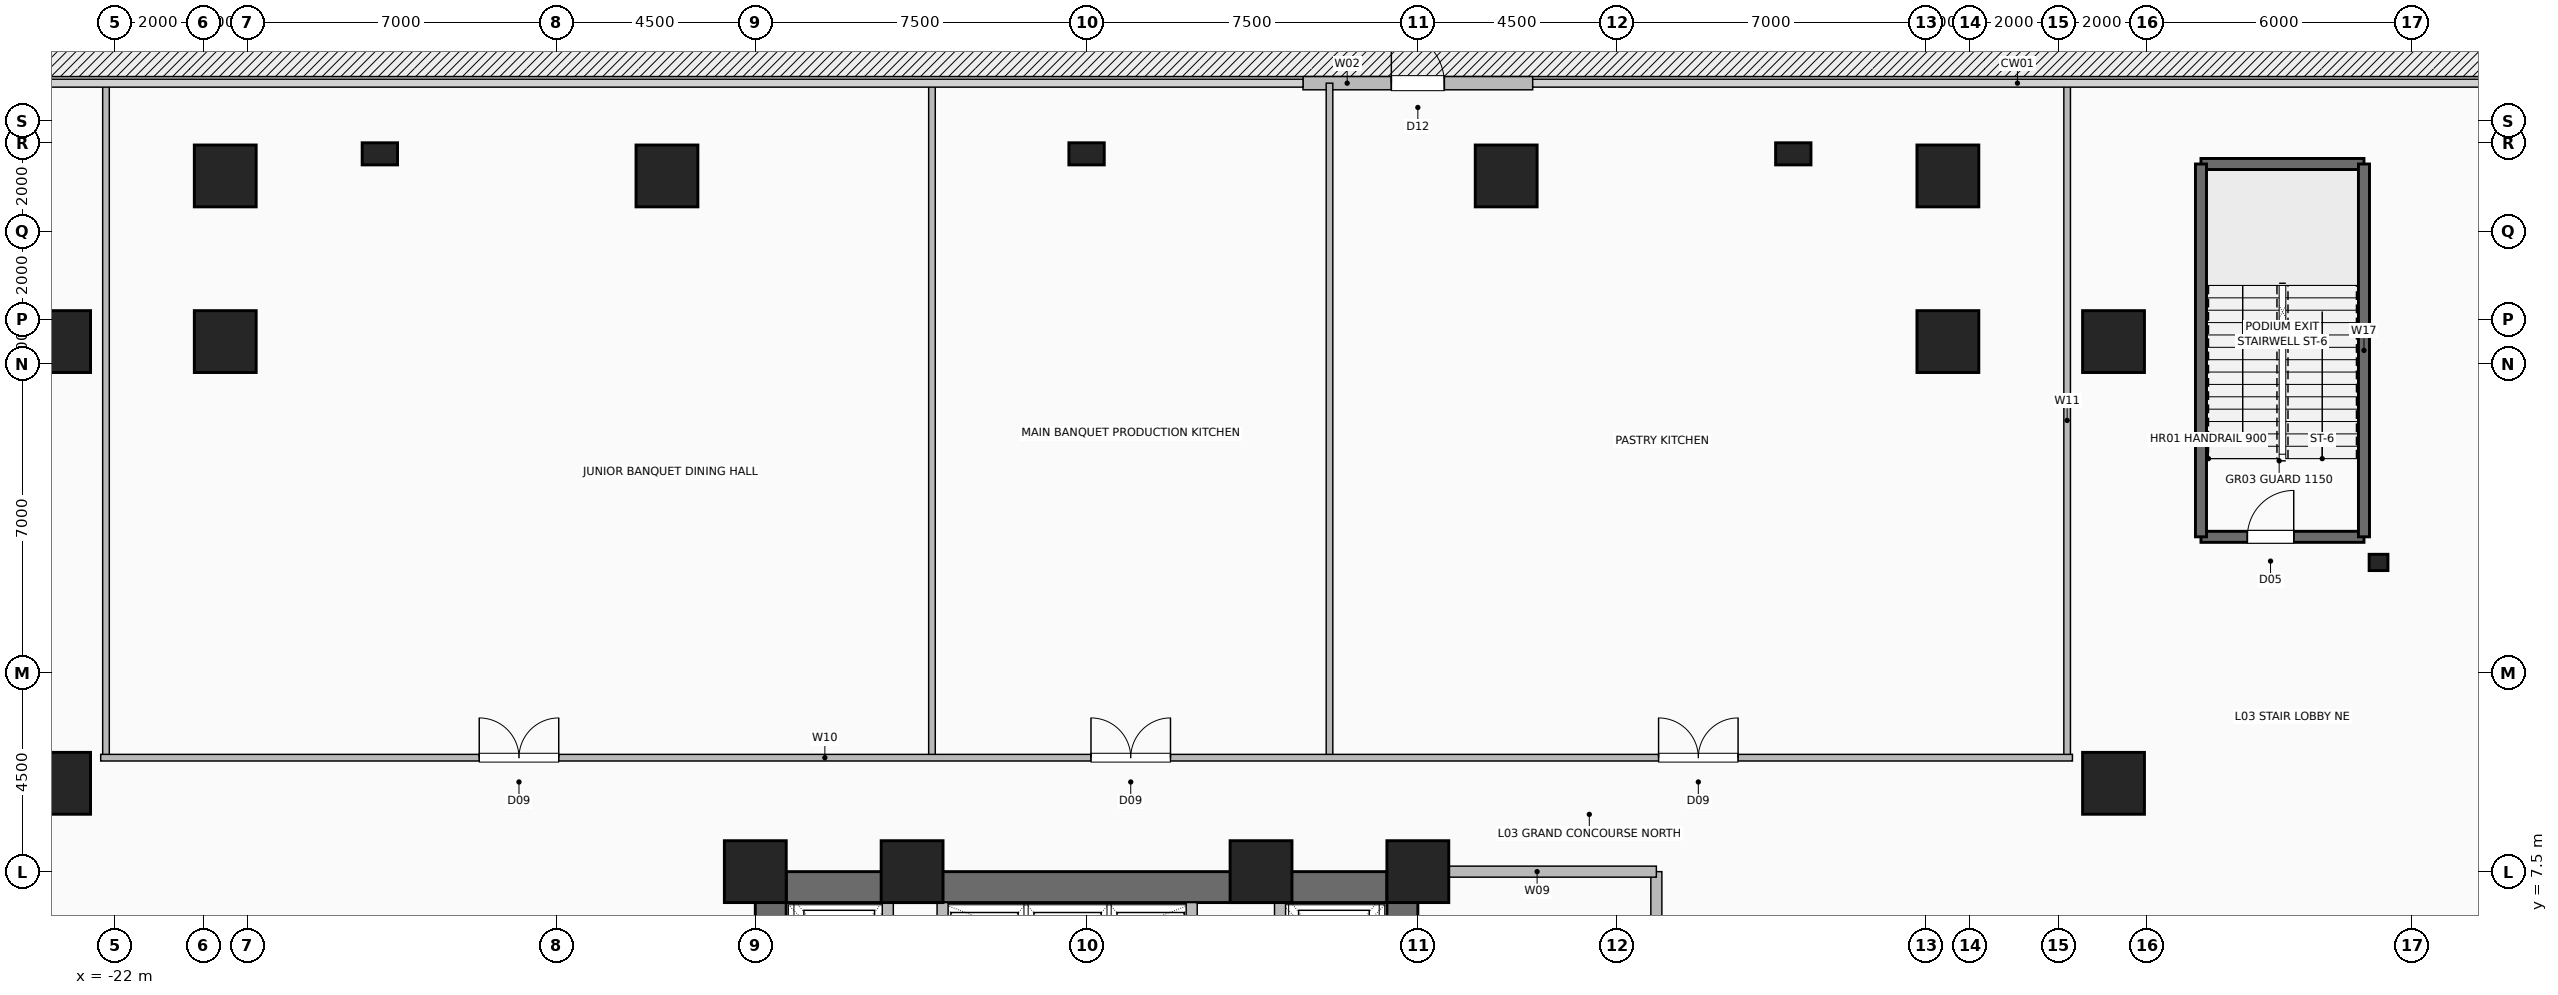
"""IFC4 building model, lengths in metres.
Left out: names, types, materials, properties, quantities, classifications, styles, units other than length and angle.
Written with IfcOpenShell. Run it as: python <this file> out.ifc"""

import sys

from ifc_helpers import new_model, si_unit, direction, frame, frame_2d, origin, origin_2d, place, context, subcontext, project, spatial, rectangle, hollow_rectangle, i_section, extrude, element, fill, save


model = new_model("IFC4")
c1 = context("Model", 3, precision=1e-05, world=origin(), true_north=direction((0.0, 1.0)))
c2 = subcontext(c1, "Body", "Model", "MODEL_VIEW")
j1 = project(units=[si_unit("LENGTHUNIT", "METRE"), si_unit("PLANEANGLEUNIT", "RADIAN")], contexts=[c1])
p1 = place(None, origin())
s1 = spatial("IfcSite", under=j1, at=p1, CompositionType="ELEMENT")
p2 = place(p1, origin())
s2 = spatial("IfcBuilding", under=s1, at=p2, CompositionType="ELEMENT")
p3 = place(p2, frame((0.0, 0.0, 16.2)))
s3 = spatial("IfcBuildingStorey", under=s2, at=p3, CompositionType="ELEMENT", Elevation=16.2)
for number, where, z_axis, x_axis in (
    (1, (7.5, 7.5, 0.0), (0.0, 0.0, 1.0), (1.0, 0.0, 0.0)),
    (2, (3.95, 7.5, 0.0), (0.0, 0.0, 1.0), (1.0, 0.0, 0.0)),
    (3, (-3.95, 7.5, 0.0), (0.0, 0.0, 1.0), (1.0, 0.0, 0.0)),
    (4, (-7.5, 7.5, 0.0), (0.0, 0.0, 1.0), (1.0, 0.0, 0.0)),
    (5, (-19.5, 23.25, 0.0), (0.0, 0.0, 1.0), (1.0, 0.0, 0.0)),
    (6, (-9.5, 23.25, 0.0), (0.0, 0.0, 1.0), (1.0, 0.0, 0.0)),
    (7, (9.5, 23.25, 0.0), (0.0, 0.0, 1.0), (1.0, 0.0, 0.0)),
    (8, (19.5, 23.25, 0.0), (0.0, 0.0, 1.0), (1.0, 0.0, 0.0)),
    (9, (-23.25, 9.5, 0.0), (0.0, 0.0, 1.0), (1.0, 0.0, 0.0)),
    (10, (-23.25, 19.5, 0.0), (0.0, 0.0, 1.0), (1.0, 0.0, 0.0)),
    (11, (23.25, 9.5, 0.0), (0.0, 0.0, 1.0), (1.0, 0.0, 0.0)),
    (12, (23.25, 19.5, 0.0), (0.0, 0.0, 1.0), (1.0, 0.0, 0.0)),
    (13, (19.5, 19.5, 0.0), (0.0, 0.0, 1.0), (1.0, 0.0, 0.0)),
    (14, (-19.5, 19.5, 0.0), (0.0, 0.0, 1.0), (1.0, 0.0, 0.0)),
):
    element("IfcColumn", number, at=place(p3, frame(where, z_axis=z_axis, x_axis=x_axis)), inside=s3, PredefinedType="COLUMN", context=c2, shape_type="SweptSolid", body=[
        extrude(hollow_rectangle(XDim=1.4, YDim=1.4, WallThickness=0.06, at=origin_2d()), origin(), (0.0, 0.0, 1.0), 5.4),
    ])
p4 = place(p3, frame((29.25, 14.5, 0.0), z_axis=(0.0, 0.0, 1.0), x_axis=(1.0, 0.0, 0.0)))
e15 = element("IfcColumn", 15, at=p4, inside=s3, PredefinedType="COLUMN", context=c2, shape_type="SweptSolid", body=[
    extrude(i_section(OverallWidth=0.368, OverallDepth=0.425, WebThickness=0.03, FlangeThickness=0.048, FilletRadius=0.02, at=origin_2d()), origin(), (0.0, 0.0, 1.0), 5.4),
])
for number, where, z_axis, x_axis in (
    (16, (-16.0, 23.75, 0.0), (0.0, 0.0, 1.0), (1.0, 0.0, 0.0)),
    (17, (0.0, 23.75, 0.0), (0.0, 0.0, 1.0), (1.0, 0.0, 0.0)),
    (18, (16.0, 23.75, 0.0), (0.0, 0.0, 1.0), (1.0, 0.0, 0.0)),
):
    element("IfcColumn", number, at=place(p3, frame(where, z_axis=z_axis, x_axis=x_axis)), inside=s3, PredefinedType="PILASTER", context=c2, shape_type="SweptSolid", body=[
        extrude(rectangle(XDim=0.5, YDim=0.8, at=origin_2d()), origin(), (0.0, 0.0, 1.0), 5.4),
    ])
p5 = place(p3, frame((4.9, 25.35, 0.0), z_axis=(0.0, 0.0, 1.0), x_axis=(1.0, 0.0, 0.0)))
e19 = element("IfcWall", 19, at=p5, inside=s3, PredefinedType="SOLIDWALL", context=c2, shape_type="SweptSolid", body=[
    extrude(rectangle(XDim=5.2, YDim=0.3, at=frame_2d((2.6, 0.0))), origin(), (0.0, 0.0, 1.0), 5.0),
])
p6 = place(p5, frame((2.0, 0.0, 0.0)))
e20 = element("IfcOpeningElement", 20, at=p6, cuts=e19, PredefinedType="OPENING", context=c2, shape_type="SweptSolid", body=[
    extrude(rectangle(XDim=1.2, YDim=2.25, at=frame_2d((0.6, 1.125))), frame((0.0, 0.16, 0.0), z_axis=(0.0, -1.0, 0.0), x_axis=(1.0, 0.0, 0.0)), (0.0, 0.0, 1.0), 0.32),
])
p7 = place(p3, frame((-7.5, 7.15, 0.0), z_axis=(0.0, 0.0, 1.0), x_axis=(1.0, 0.0, 0.0)))
e21 = element("IfcWall", 21, at=p7, inside=s3, PredefinedType="SHEAR", context=c2, shape_type="SweptSolid", body=[
    extrude(rectangle(XDim=15.0, YDim=0.7, at=frame_2d((7.5, 0.0))), origin(), (0.0, 0.0, 1.0), 5.0),
])
p8 = place(p3, frame((-7.15, -7.5, 0.0), z_axis=(0.0, 0.0, 1.0), x_axis=(0.0, 1.0, 0.0)))
e22 = element("IfcWall", 22, at=p8, inside=s3, PredefinedType="SHEAR", context=c2, shape_type="SweptSolid", body=[
    extrude(rectangle(XDim=15.0, YDim=0.7, at=frame_2d((7.5, 0.0))), origin(), (0.0, 0.0, 1.0), 5.0),
])
p9 = place(p8, frame((9.5, 0.0, 0.0)))
e23 = element("IfcOpeningElement", 23, at=p9, cuts=e22, PredefinedType="OPENING", context=c2, shape_type="SweptSolid", body=[
    extrude(rectangle(XDim=1.0, YDim=2.08, at=frame_2d((0.5, 1.04))), frame((0.0, 0.36, 0.0), z_axis=(0.0, -1.0, 0.0), x_axis=(1.0, 0.0, 0.0)), (0.0, 0.0, 1.0), 0.72),
])
p10 = place(p3, frame((7.15, -7.5, 0.0), z_axis=(0.0, 0.0, 1.0), x_axis=(0.0, 1.0, 0.0)))
e24 = element("IfcWall", 24, at=p10, inside=s3, PredefinedType="SHEAR", context=c2, shape_type="SweptSolid", body=[
    extrude(rectangle(XDim=15.0, YDim=0.7, at=frame_2d((7.5, 0.0))), origin(), (0.0, 0.0, 1.0), 5.0),
])
p11 = place(p10, frame((12.6, 0.0, 0.0)))
e25 = element("IfcOpeningElement", 25, at=p11, cuts=e24, PredefinedType="OPENING", context=c2, shape_type="SweptSolid", body=[
    extrude(rectangle(XDim=1.2, YDim=2.2, at=frame_2d((0.6, 1.1))), frame((0.0, 0.36, 0.0), z_axis=(0.0, -1.0, 0.0), x_axis=(1.0, 0.0, 0.0)), (0.0, 0.0, 1.0), 0.72),
])
for number, where, z_axis, x_axis in (
    (26, (-3.26, 4.58, 0.0), (0.0, 0.0, 1.0), (0.0, 1.0, 0.0)),
    (27, (2.38, 4.58, 0.0), (0.0, 0.0, 1.0), (0.0, 1.0, 0.0)),
):
    element("IfcWall", number, at=place(p3, frame(where, z_axis=z_axis, x_axis=x_axis)), inside=s3, PredefinedType="SHEAR", context=c2, shape_type="SweptSolid", body=[
        extrude(rectangle(XDim=2.22, YDim=0.25, at=frame_2d((1.11, 0.0))), origin(), (0.0, 0.0, 1.0), 5.0),
    ])
p12 = place(p3, frame((-4.5, 4.35, 0.0), z_axis=(0.0, 0.0, 1.0), x_axis=(0.0, 1.0, 0.0)))
e28 = element("IfcWall", 28, at=p12, inside=s3, PredefinedType="SHEAR", context=c2, shape_type="SweptSolid", body=[
    extrude(rectangle(XDim=2.85, YDim=0.25, at=frame_2d((1.425, 0.0))), origin(), (0.0, 0.0, 1.0), 5.0),
])
p13 = place(p3, frame((4.38, 4.3, 0.0), z_axis=(0.0, 0.0, 1.0), x_axis=(0.0, 1.0, 0.0)))
e29 = element("IfcWall", 29, at=p13, inside=s3, PredefinedType="SHEAR", context=c2, shape_type="SweptSolid", body=[
    extrude(rectangle(XDim=2.5, YDim=0.25, at=frame_2d((1.25, 0.0))), origin(), (0.0, 0.0, 1.0), 5.0),
])
p14 = place(p3, frame((25.23, 15.08, 0.0), z_axis=(0.0, 0.0, 1.0), x_axis=(1.0, 0.0, 0.0)))
e30 = element("IfcWall", 30, at=p14, inside=s3, PredefinedType="SHEAR", context=c2, shape_type="SweptSolid", body=[
    extrude(rectangle(XDim=3.69, YDim=0.25, at=frame_2d((1.845, 0.0))), origin(), (0.0, 0.0, 1.0), 5.0),
])
p15 = place(p14, frame((1.05, 0.0, 0.0)))
e31 = element("IfcOpeningElement", 31, at=p15, cuts=e30, PredefinedType="OPENING", context=c2, shape_type="SweptSolid", body=[
    extrude(rectangle(XDim=1.05, YDim=2.08, at=frame_2d((0.525, 1.04))), frame((0.0, 0.135, 0.0), z_axis=(0.0, -1.0, 0.0), x_axis=(1.0, 0.0, 0.0)), (0.0, 0.0, 1.0), 0.27),
])
p16 = place(p3, frame((25.23, 23.52, 0.0), z_axis=(0.0, 0.0, 1.0), x_axis=(1.0, 0.0, 0.0)))
e32 = element("IfcWall", 32, at=p16, inside=s3, PredefinedType="SHEAR", context=c2, shape_type="SweptSolid", body=[
    extrude(rectangle(XDim=3.69, YDim=0.25, at=frame_2d((1.845, 0.0))), origin(), (0.0, 0.0, 1.0), 5.0),
])
for number, where, z_axis, x_axis in (
    (33, (25.23, 15.08, 0.0), (0.0, 0.0, 1.0), (0.0, 1.0, 0.0)),
    (34, (28.92, 15.08, 0.0), (0.0, 0.0, 1.0), (0.0, 1.0, 0.0)),
):
    element("IfcWall", number, at=place(p3, frame(where, z_axis=z_axis, x_axis=x_axis)), inside=s3, PredefinedType="SHEAR", context=c2, shape_type="SweptSolid", body=[
        extrude(rectangle(XDim=8.44, YDim=0.25, at=frame_2d((4.22, 0.0))), origin(), (0.0, 0.0, 1.0), 5.0),
    ])
p17 = place(p3, frame((12.9, 1.75, 0.0), z_axis=(0.0, 0.0, 1.0), x_axis=(0.0, 1.0, 0.0)))
e35 = element("IfcWall", 35, at=p17, inside=s3, PredefinedType="SHEAR", context=c2, shape_type="SweptSolid", body=[
    extrude(rectangle(XDim=5.75, YDim=0.25, at=frame_2d((2.875, 0.0))), origin(), (0.0, 0.0, 1.0), 5.0),
])
p18 = place(p17, frame((1.8, 0.0, 0.0)))
e36 = element("IfcOpeningElement", 36, at=p18, cuts=e35, PredefinedType="OPENING", context=c2, shape_type="SweptSolid", body=[
    extrude(rectangle(XDim=1.0, YDim=2.08, at=frame_2d((0.5, 1.04))), frame((0.0, 0.135, 0.0), z_axis=(0.0, -1.0, 0.0), x_axis=(1.0, 0.0, 0.0)), (0.0, 0.0, 1.0), 0.27),
])
p19 = place(p3, frame((7.5, 7.5, 0.0), z_axis=(0.0, 0.0, 1.0), x_axis=(1.0, 0.0, 0.0)))
e37 = element("IfcWall", 37, at=p19, inside=s3, PredefinedType="SHEAR", context=c2, shape_type="SweptSolid", body=[
    extrude(rectangle(XDim=5.4, YDim=0.25, at=frame_2d((2.7, 0.0))), origin(), (0.0, 0.0, 1.0), 5.0),
])
for number, where, z_axis, x_axis in (
    (38, (-22.2, 10.08, 0.0), (0.0, 0.0, 1.0), (0.0, 1.0, 0.0)),
    (39, (-3.5, 10.08, 0.0), (0.0, 0.0, 1.0), (0.0, 1.0, 0.0)),
    (40, (5.5, 10.08, 0.0), (0.0, 0.0, 1.0), (0.0, 1.0, 0.0)),
    (41, (22.2, 10.08, 0.0), (0.0, 0.0, 1.0), (0.0, 1.0, 0.0)),
):
    element("IfcWall", number, at=place(p3, frame(where, z_axis=z_axis, x_axis=x_axis)), inside=s3, PredefinedType="PARTITIONING", context=c2, shape_type="SweptSolid", body=[
        extrude(rectangle(XDim=15.27, YDim=0.15, at=frame_2d((7.635, 0.0))), origin(), (0.0, 0.0, 1.0), 5.0),
    ])
p20 = place(p3, frame((-22.32, 10.08, 0.0), z_axis=(0.0, 0.0, 1.0), x_axis=(1.0, 0.0, 0.0)))
e42 = element("IfcWall", 42, at=p20, inside=s3, PredefinedType="PARTITIONING", context=c2, shape_type="SweptSolid", body=[
    extrude(rectangle(XDim=44.64, YDim=0.15, at=frame_2d((22.32, 0.0))), origin(), (0.0, 0.0, 1.0), 5.0),
])
p21 = place(p20, frame((8.57, 0.0, 0.0)))
e43 = element("IfcOpeningElement", 43, at=p21, cuts=e42, PredefinedType="OPENING", context=c2, shape_type="SweptSolid", body=[
    extrude(rectangle(XDim=1.8, YDim=2.08, at=frame_2d((0.9, 1.04))), frame((0.0, 0.085, 0.0), z_axis=(0.0, -1.0, 0.0), x_axis=(1.0, 0.0, 0.0)), (0.0, 0.0, 1.0), 0.17),
])
p22 = place(p20, frame((22.42, 0.0, 0.0)))
e44 = element("IfcOpeningElement", 44, at=p22, cuts=e42, PredefinedType="OPENING", context=c2, shape_type="SweptSolid", body=[
    extrude(rectangle(XDim=1.8, YDim=2.08, at=frame_2d((0.9, 1.04))), frame((0.0, 0.085, 0.0), z_axis=(0.0, -1.0, 0.0), x_axis=(1.0, 0.0, 0.0)), (0.0, 0.0, 1.0), 0.17),
])
p23 = place(p20, frame((35.27, 0.0, 0.0)))
e45 = element("IfcOpeningElement", 45, at=p23, cuts=e42, PredefinedType="OPENING", context=c2, shape_type="SweptSolid", body=[
    extrude(rectangle(XDim=1.8, YDim=2.08, at=frame_2d((0.9, 1.04))), frame((0.0, 0.085, 0.0), z_axis=(0.0, -1.0, 0.0), x_axis=(1.0, 0.0, 0.0)), (0.0, 0.0, 1.0), 0.17),
])
p24 = place(p6, origin())
e46 = element("IfcDoor", 46, at=p24, inside=s3, OperationType="SINGLE_SWING_LEFT", PredefinedType="DOOR", context=c2, shape_type="SweptSolid", body=[
    extrude(rectangle(XDim=1.2, YDim=2.25, at=frame_2d((0.6, 1.125))), frame((0.0, 0.025, 0.0), z_axis=(0.0, -1.0, 0.0), x_axis=(1.0, 0.0, 0.0)), (0.0, 0.0, 1.0), 0.05),
])
fill(e20, e46)
p25 = place(p15, origin())
e47 = element("IfcDoor", 47, at=p25, inside=s3, OperationType="SINGLE_SWING_RIGHT", PredefinedType="DOOR", context=c2, shape_type="SweptSolid", body=[
    extrude(rectangle(XDim=1.05, YDim=2.08, at=frame_2d((0.525, 1.04))), frame((0.0, 0.025, 0.0), z_axis=(0.0, -1.0, 0.0), x_axis=(1.0, 0.0, 0.0)), (0.0, 0.0, 1.0), 0.05),
])
fill(e31, e47)
p26 = place(p21, origin())
e48 = element("IfcDoor", 48, at=p26, inside=s3, OperationType="DOUBLE_DOOR_SINGLE_SWING", PredefinedType="DOOR", context=c2, shape_type="SweptSolid", body=[
    extrude(rectangle(XDim=1.8, YDim=2.08, at=frame_2d((0.9, 1.04))), frame((0.0, 0.025, 0.0), z_axis=(0.0, -1.0, 0.0), x_axis=(1.0, 0.0, 0.0)), (0.0, 0.0, 1.0), 0.05),
])
fill(e43, e48)
p27 = place(p22, origin())
e49 = element("IfcDoor", 49, at=p27, inside=s3, OperationType="DOUBLE_DOOR_SINGLE_SWING", PredefinedType="DOOR", context=c2, shape_type="SweptSolid", body=[
    extrude(rectangle(XDim=1.8, YDim=2.08, at=frame_2d((0.9, 1.04))), frame((0.0, 0.025, 0.0), z_axis=(0.0, -1.0, 0.0), x_axis=(1.0, 0.0, 0.0)), (0.0, 0.0, 1.0), 0.05),
])
fill(e44, e49)
p28 = place(p23, origin())
e50 = element("IfcDoor", 50, at=p28, inside=s3, OperationType="DOUBLE_DOOR_SINGLE_SWING", PredefinedType="DOOR", context=c2, shape_type="SweptSolid", body=[
    extrude(rectangle(XDim=1.8, YDim=2.08, at=frame_2d((0.9, 1.04))), frame((0.0, 0.025, 0.0), z_axis=(0.0, -1.0, 0.0), x_axis=(1.0, 0.0, 0.0)), (0.0, 0.0, 1.0), 0.05),
])
fill(e45, e50)
save(model, sys.argv[1])
